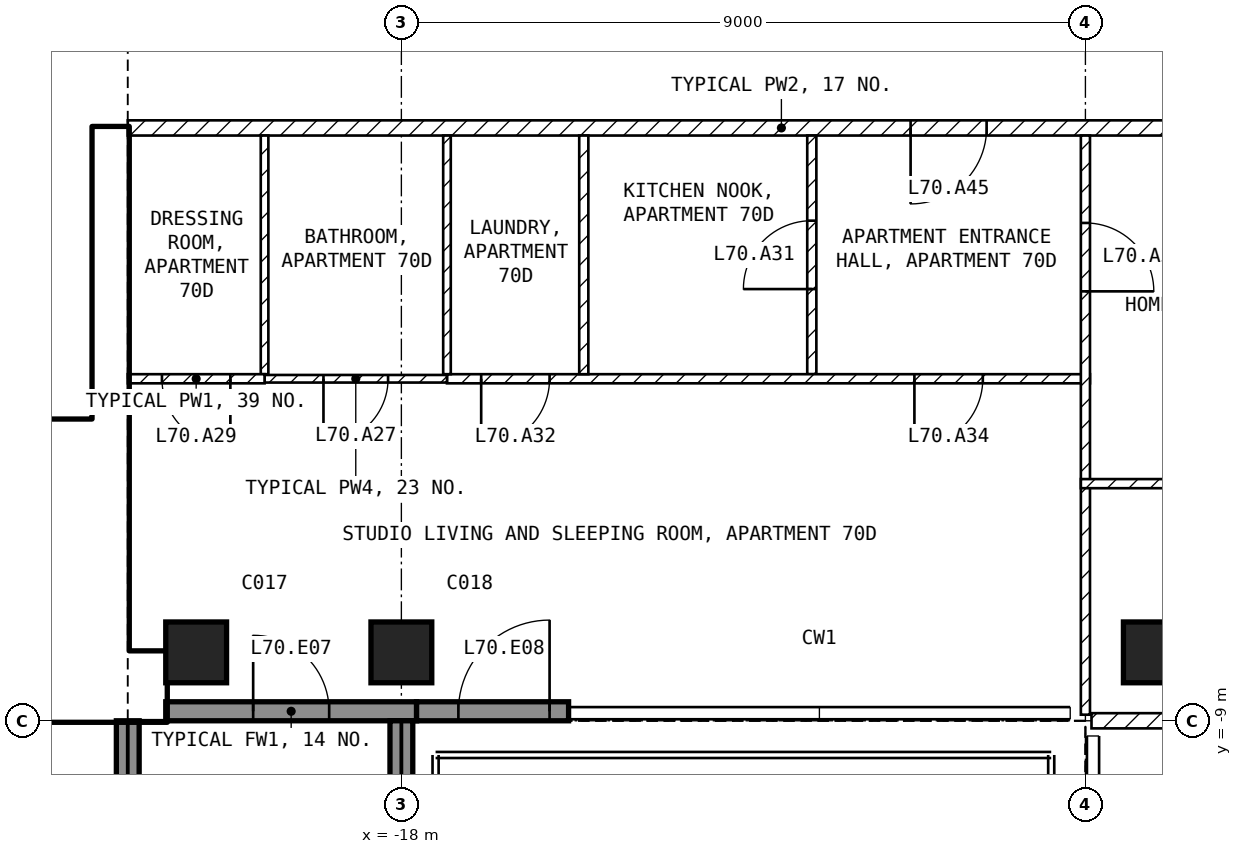
"""IFC4 building model, lengths in metres.
Left out: names, types, materials, properties, quantities, classifications, styles, units other than length and angle.
Written with IfcOpenShell. Run it as: python <this file> out.ifc"""

import sys

from ifc_helpers import new_model, si_unit, direction, frame, frame_2d, origin, origin_2d, place, context, subcontext, project, spatial, rectangle, extrude, element, fill, save


model = new_model("IFC4")
c1 = context("Model", 3, precision=1e-05, world=origin(), true_north=direction((0.0, 1.0)))
c2 = subcontext(c1, "Body", "Model", "MODEL_VIEW")
j1 = project(units=[si_unit("LENGTHUNIT", "METRE"), si_unit("PLANEANGLEUNIT", "RADIAN")], contexts=[c1])
p1 = place(None, origin())
s1 = spatial("IfcSite", under=j1, at=p1, CompositionType="ELEMENT")
p2 = place(p1, origin())
s2 = spatial("IfcBuilding", under=s1, at=p2, CompositionType="ELEMENT")
p3 = place(p2, frame((0.0, 0.0, 274.5)))
s3 = spatial("IfcBuildingStorey", under=s2, at=p3, CompositionType="ELEMENT", Elevation=274.5)
for number, where, z_axis, x_axis in (
    (1, (-20.7, -8.1, -0.25), (0.0, 0.0, 1.0), (1.0, 0.0, 0.0)),
    (2, (-18.0, -8.1, -0.25), (0.0, 0.0, 1.0), (1.0, 0.0, 0.0)),
    (3, (-8.1, -8.1, -0.25), (0.0, 0.0, 1.0), (1.0, 0.0, 0.0)),
):
    element("IfcColumn", number, at=place(p3, frame(where, z_axis=z_axis, x_axis=x_axis)), inside=s3, PredefinedType="COLUMN", context=c2, shape_type="SweptSolid", body=[
        extrude(rectangle(XDim=0.8, YDim=0.8, at=origin_2d()), origin(), (0.0, 0.0, 1.0), 3.5),
    ])
p4 = place(p3, frame((-21.1, -8.875, 0.0), z_axis=(0.0, 0.0, 1.0), x_axis=(1.0, 0.0, 0.0)))
e4 = element("IfcWall", 4, at=p4, inside=s3, PredefinedType="SOLIDWALL", context=c2, shape_type="SweptSolid", body=[
    extrude(rectangle(XDim=3.3, YDim=0.25, at=frame_2d((1.65, 0.0))), origin(), (0.0, 0.0, 1.0), 3.25),
])
p5 = place(p4, frame((1.15, 0.0, 0.0)))
e5 = element("IfcOpeningElement", 5, at=p5, cuts=e4, PredefinedType="OPENING", context=c2, shape_type="SweptSolid", body=[
    extrude(rectangle(XDim=1.0, YDim=2.4, at=frame_2d((0.5, 1.2))), frame((0.0, 0.135, 0.0), z_axis=(0.0, -1.0, 0.0), x_axis=(1.0, 0.0, 0.0)), (0.0, 0.0, 1.0), 0.27),
])
p6 = place(p3, frame((-17.8, -8.875, 0.0), z_axis=(0.0, 0.0, 1.0), x_axis=(1.0, 0.0, 0.0)))
e6 = element("IfcWall", 6, at=p6, inside=s3, PredefinedType="SOLIDWALL", context=c2, shape_type="SweptSolid", body=[
    extrude(rectangle(XDim=2.0, YDim=0.25, at=frame_2d((1.0, 0.0))), origin(), (0.0, 0.0, 1.0), 3.25),
])
p7 = place(p6, frame((0.55, 0.0, 0.0)))
e7 = element("IfcOpeningElement", 7, at=p7, cuts=e6, PredefinedType="OPENING", context=c2, shape_type="SweptSolid", body=[
    extrude(rectangle(XDim=1.2, YDim=2.4, at=frame_2d((0.6, 1.2))), frame((0.0, 0.135, 0.0), z_axis=(0.0, -1.0, 0.0), x_axis=(1.0, 0.0, 0.0)), (0.0, 0.0, 1.0), 0.27),
])
p8 = place(p3, frame((-21.6, -9.0, 0.0), z_axis=(0.0, 0.0, 1.0), x_axis=(0.0, -1.0, 0.0)))
e8 = element("IfcWall", 8, at=p8, inside=s3, PredefinedType="SOLIDWALL", context=c2, shape_type="SweptSolid", body=[
    extrude(rectangle(XDim=2.7, YDim=0.3, at=frame_2d((1.35, 0.0))), origin(), (0.0, 0.0, 1.0), 3.25),
])
p9 = place(p3, frame((-18.0, -9.0, 0.0), z_axis=(0.0, 0.0, 1.0), x_axis=(0.0, -1.0, 0.0)))
e9 = element("IfcWall", 9, at=p9, inside=s3, PredefinedType="SOLIDWALL", context=c2, shape_type="SweptSolid", body=[
    extrude(rectangle(XDim=2.74, YDim=0.3, at=frame_2d((1.37, 0.0))), origin(), (0.0, 0.0, 1.0), 3.25),
])
p10 = place(p3, frame((-30.2, -8.55, 0.0), z_axis=(0.0, 0.0, 1.0), x_axis=(1.0, 0.0, 0.0)))
e10 = element("IfcWall", 10, at=p10, inside=s3, PredefinedType="SHEAR", context=c2, shape_type="SweptSolid", body=[
    extrude(rectangle(XDim=9.1, YDim=0.9, at=frame_2d((4.55, 0.0))), origin(), (0.0, 0.0, 1.0), 3.25),
])
p11 = place(p3, frame((-21.825, -8.1, 0.0), z_axis=(0.0, 0.0, 1.0), x_axis=(0.0, 1.0, 0.0)))
e11 = element("IfcWall", 11, at=p11, inside=s3, PredefinedType="SHEAR", context=c2, shape_type="SweptSolid", body=[
    extrude(rectangle(XDim=6.9, YDim=0.45, at=frame_2d((3.45, 0.0))), origin(), (0.0, 0.0, 1.0), 3.25),
])
p12 = place(p3, frame((-28.35, -5.15, 0.0), z_axis=(0.0, 0.0, 1.0), x_axis=(1.0, 0.0, 0.0)))
e12 = element("IfcWall", 12, at=p12, inside=s3, PredefinedType="SOLIDWALL", context=c2, shape_type="SweptSolid", body=[
    extrude(rectangle(XDim=6.3, YDim=0.2, at=frame_2d((3.15, 0.0))), origin(), (0.0, 0.0, 1.0), 3.25),
])
p13 = place(p12, frame((5.1, 0.0, 0.0)))
e13 = element("IfcOpeningElement", 13, at=p13, cuts=e12, PredefinedType="OPENING", context=c2, shape_type="SweptSolid", body=[
    extrude(rectangle(XDim=1.0, YDim=2.1, at=frame_2d((0.5, 1.05))), frame((0.0, 0.11, 0.0), z_axis=(0.0, -1.0, 0.0), x_axis=(1.0, 0.0, 0.0)), (0.0, 0.0, 1.0), 0.22),
])
p14 = place(p3, frame((-4.4, -1.2, 0.0), z_axis=(0.0, 0.0, 1.0), x_axis=(-1.0, 0.0, 0.0)))
e14 = element("IfcWall", 14, at=p14, inside=s3, PredefinedType="PARTITIONING", context=c2, shape_type="SweptSolid", body=[
    extrude(rectangle(XDim=17.2, YDim=0.2, at=frame_2d((8.6, 0.0))), origin(), (0.0, 0.0, 1.0), 3.25),
])
p15 = place(p14, frame((5.9, 0.0, 0.0)))
e15 = element("IfcOpeningElement", 15, at=p15, cuts=e14, PredefinedType="OPENING", context=c2, shape_type="SweptSolid", body=[
    extrude(rectangle(XDim=1.0, YDim=2.1, at=frame_2d((0.5, 1.05))), frame((0.0, 0.11, 0.0), z_axis=(0.0, -1.0, 0.0), x_axis=(1.0, 0.0, 0.0)), (0.0, 0.0, 1.0), 0.22),
])
p16 = place(p3, frame((8.92, -9.0, 0.0), z_axis=(0.0, 0.0, 1.0), x_axis=(-1.0, 0.0, 0.0)))
e16 = element("IfcWall", 16, at=p16, inside=s3, PredefinedType="PARTITIONING", context=c2, shape_type="SweptSolid", body=[
    extrude(rectangle(XDim=17.84, YDim=0.2, at=frame_2d((8.92, 0.0))), origin(), (0.0, 0.0, 1.0), 3.25),
])
p17 = place(p16, frame((8.42, 0.0, 0.0)))
e17 = element("IfcOpeningElement", 17, at=p17, cuts=e16, PredefinedType="OPENING", context=c2, shape_type="SweptSolid", body=[
    extrude(rectangle(XDim=1.0, YDim=2.1, at=frame_2d((0.5, 1.05))), frame((0.0, 0.11, 0.0), z_axis=(0.0, -1.0, 0.0), x_axis=(1.0, 0.0, 0.0)), (0.0, 0.0, 1.0), 0.22),
])
p18 = place(p3, frame((-12.6, -4.44, 0.0), z_axis=(0.0, 0.0, 1.0), x_axis=(0.0, 1.0, 0.0)))
e18 = element("IfcWall", 18, at=p18, inside=s3, PredefinedType="PARTITIONING", context=c2, shape_type="SweptSolid", body=[
    extrude(rectangle(XDim=3.14, YDim=0.12, at=frame_2d((1.57, 0.0))), origin(), (0.0, 0.0, 1.0), 3.25),
])
p19 = place(p18, frame((1.12, 0.0, 0.0)))
e19 = element("IfcOpeningElement", 19, at=p19, cuts=e18, PredefinedType="OPENING", context=c2, shape_type="SweptSolid", body=[
    extrude(rectangle(XDim=0.9, YDim=2.1, at=frame_2d((0.45, 1.05))), frame((0.0, 0.07, 0.0), z_axis=(0.0, -1.0, 0.0), x_axis=(1.0, 0.0, 0.0)), (0.0, 0.0, 1.0), 0.14),
])
p20 = place(p3, frame((-8.94, -4.5, 0.0), z_axis=(0.0, 0.0, 1.0), x_axis=(-1.0, 0.0, 0.0)))
e20 = element("IfcWall", 20, at=p20, inside=s3, PredefinedType="PARTITIONING", context=c2, shape_type="SweptSolid", body=[
    extrude(rectangle(XDim=8.46, YDim=0.12, at=frame_2d((4.23, 0.0))), origin(), (0.0, 0.0, 1.0), 3.25),
])
p21 = place(p20, frame((7.11, 0.0, 0.0)))
e21 = element("IfcOpeningElement", 21, at=p21, cuts=e20, PredefinedType="OPENING", context=c2, shape_type="SweptSolid", body=[
    extrude(rectangle(XDim=0.9, YDim=2.1, at=frame_2d((0.45, 1.05))), frame((0.0, 0.07, 0.0), z_axis=(0.0, -1.0, 0.0), x_axis=(1.0, 0.0, 0.0)), (0.0, 0.0, 1.0), 0.14),
])
p22 = place(p20, frame((1.41, 0.0, 0.0)))
e22 = element("IfcOpeningElement", 22, at=p22, cuts=e20, PredefinedType="OPENING", context=c2, shape_type="SweptSolid", body=[
    extrude(rectangle(XDim=0.9, YDim=2.1, at=frame_2d((0.45, 1.05))), frame((0.0, 0.07, 0.0), z_axis=(0.0, -1.0, 0.0), x_axis=(1.0, 0.0, 0.0)), (0.0, 0.0, 1.0), 0.14),
])
p23 = place(p3, frame((-9.0, -1.3, 0.0), z_axis=(0.0, 0.0, 1.0), x_axis=(0.0, -1.0, 0.0)))
e23 = element("IfcWall", 23, at=p23, inside=s3, PredefinedType="PARTITIONING", context=c2, shape_type="SweptSolid", body=[
    extrude(rectangle(XDim=7.62, YDim=0.12, at=frame_2d((3.81, 0.0))), origin(), (0.0, 0.0, 1.0), 3.25),
])
p24 = place(p23, frame((1.15, 0.0, 0.0)))
e24 = element("IfcOpeningElement", 24, at=p24, cuts=e23, PredefinedType="OPENING", context=c2, shape_type="SweptSolid", body=[
    extrude(rectangle(XDim=0.9, YDim=2.1, at=frame_2d((0.45, 1.05))), frame((0.0, 0.07, 0.0), z_axis=(0.0, -1.0, 0.0), x_axis=(1.0, 0.0, 0.0)), (0.0, 0.0, 1.0), 0.14),
])
p25 = place(p3, frame((-15.6, -4.44, 0.0), z_axis=(0.0, 0.0, 1.0), x_axis=(0.0, 1.0, 0.0)))
e25 = element("IfcWall", 25, at=p25, inside=s3, PredefinedType="PARTITIONING", context=c2, shape_type="SweptSolid", body=[
    extrude(rectangle(XDim=3.14, YDim=0.12, at=frame_2d((1.57, 0.0))), origin(), (0.0, 0.0, 1.0), 3.25),
])
for number, where, z_axis, x_axis in (
    (26, (-17.4, -4.44, 0.0), (0.0, 0.0, 1.0), (0.0, 1.0, 0.0)),
    (27, (-19.8, -4.44, 0.0), (0.0, 0.0, 1.0), (0.0, 1.0, 0.0)),
):
    element("IfcWall", number, at=place(p3, frame(where, z_axis=z_axis, x_axis=x_axis)), inside=s3, PredefinedType="PARTITIONING", context=c2, shape_type="SweptSolid", body=[
        extrude(rectangle(XDim=3.14, YDim=0.1, at=frame_2d((1.57, 0.0))), origin(), (0.0, 0.0, 1.0), 3.25),
    ])
p26 = place(p3, frame((-17.4, -4.5, 0.0), z_axis=(0.0, 0.0, 1.0), x_axis=(-1.0, 0.0, 0.0)))
e28 = element("IfcWall", 28, at=p26, inside=s3, PredefinedType="PARTITIONING", context=c2, shape_type="SweptSolid", body=[
    extrude(rectangle(XDim=2.4, YDim=0.1, at=frame_2d((1.2, 0.0))), origin(), (0.0, 0.0, 1.0), 3.25),
])
p27 = place(p26, frame((0.775, 0.0, 0.0)))
e29 = element("IfcOpeningElement", 29, at=p27, cuts=e28, PredefinedType="OPENING", context=c2, shape_type="SweptSolid", body=[
    extrude(rectangle(XDim=0.85, YDim=2.1, at=frame_2d((0.425, 1.05))), frame((0.0, 0.06, 0.0), z_axis=(0.0, -1.0, 0.0), x_axis=(1.0, 0.0, 0.0)), (0.0, 0.0, 1.0), 0.12),
])
p28 = place(p3, frame((-19.8, -4.5, 0.0), z_axis=(0.0, 0.0, 1.0), x_axis=(-1.0, 0.0, 0.0)))
e30 = element("IfcWall", 30, at=p28, inside=s3, PredefinedType="PARTITIONING", context=c2, shape_type="SweptSolid", body=[
    extrude(rectangle(XDim=1.8, YDim=0.12, at=frame_2d((0.9, 0.0))), origin(), (0.0, 0.0, 1.0), 3.25),
])
p29 = place(p28, frame((0.45, 0.0, 0.0)))
e31 = element("IfcOpeningElement", 31, at=p29, cuts=e30, PredefinedType="OPENING", context=c2, shape_type="SweptSolid", body=[
    extrude(rectangle(XDim=0.9, YDim=2.1, at=frame_2d((0.45, 1.05))), frame((0.0, 0.07, 0.0), z_axis=(0.0, -1.0, 0.0), x_axis=(1.0, 0.0, 0.0)), (0.0, 0.0, 1.0), 0.14),
])
p30 = place(p3, frame((-4.44, -5.88, 0.0), z_axis=(0.0, 0.0, 1.0), x_axis=(-1.0, 0.0, 0.0)))
e32 = element("IfcWall", 32, at=p30, inside=s3, PredefinedType="PARTITIONING", context=c2, shape_type="SweptSolid", body=[
    extrude(rectangle(XDim=4.62, YDim=0.12, at=frame_2d((2.31, 0.0))), origin(), (0.0, 0.0, 1.0), 3.25),
])
p31 = place(p30, frame((1.86, 0.0, 0.0)))
e33 = element("IfcOpeningElement", 33, at=p31, cuts=e32, PredefinedType="OPENING", context=c2, shape_type="SweptSolid", body=[
    extrude(rectangle(XDim=0.9, YDim=2.1, at=frame_2d((0.45, 1.05))), frame((0.0, 0.07, 0.0), z_axis=(0.0, -1.0, 0.0), x_axis=(1.0, 0.0, 0.0)), (0.0, 0.0, 1.0), 0.14),
])
p32 = place(p5, origin())
e34 = element("IfcDoor", 34, at=p32, inside=s3, OperationType="SINGLE_SWING_LEFT", PredefinedType="DOOR", context=c2, shape_type="SweptSolid", body=[
    extrude(rectangle(XDim=1.0, YDim=2.4, at=frame_2d((0.5, 1.2))), frame((0.0, 0.025, 0.0), z_axis=(0.0, -1.0, 0.0), x_axis=(1.0, 0.0, 0.0)), (0.0, 0.0, 1.0), 0.05),
])
fill(e5, e34)
p33 = place(p7, origin())
e35 = element("IfcDoor", 35, at=p33, inside=s3, OperationType="SINGLE_SWING_RIGHT", PredefinedType="DOOR", context=c2, shape_type="SweptSolid", body=[
    extrude(rectangle(XDim=1.2, YDim=2.4, at=frame_2d((0.6, 1.2))), frame((0.0, 0.025, 0.0), z_axis=(0.0, -1.0, 0.0), x_axis=(1.0, 0.0, 0.0)), (0.0, 0.0, 1.0), 0.05),
])
fill(e7, e35)
p34 = place(p13, origin())
e36 = element("IfcDoor", 36, at=p34, inside=s3, OperationType="SINGLE_SWING_LEFT", PredefinedType="DOOR", context=c2, shape_type="SweptSolid", body=[
    extrude(rectangle(XDim=1.0, YDim=2.1, at=frame_2d((0.5, 1.05))), frame((0.0, 0.025, 0.0), z_axis=(0.0, -1.0, 0.0), x_axis=(1.0, 0.0, 0.0)), (0.0, 0.0, 1.0), 0.05),
])
fill(e13, e36)
p35 = place(p27, origin())
e37 = element("IfcDoor", 37, at=p35, inside=s3, OperationType="SINGLE_SWING_RIGHT", PredefinedType="DOOR", context=c2, shape_type="SweptSolid", body=[
    extrude(rectangle(XDim=0.85, YDim=2.1, at=frame_2d((0.425, 1.05))), frame((0.0, 0.025, 0.0), z_axis=(0.0, -1.0, 0.0), x_axis=(1.0, 0.0, 0.0)), (0.0, 0.0, 1.0), 0.05),
])
fill(e29, e37)
p36 = place(p29, origin())
e38 = element("IfcDoor", 38, at=p36, inside=s3, OperationType="SINGLE_SWING_LEFT", PredefinedType="DOOR", context=c2, shape_type="SweptSolid", body=[
    extrude(rectangle(XDim=0.9, YDim=2.1, at=frame_2d((0.45, 1.05))), frame((0.0, 0.025, 0.0), z_axis=(0.0, -1.0, 0.0), x_axis=(1.0, 0.0, 0.0)), (0.0, 0.0, 1.0), 0.05),
])
fill(e31, e38)
p37 = place(p24, origin())
e39 = element("IfcDoor", 39, at=p37, inside=s3, OperationType="SINGLE_SWING_RIGHT", PredefinedType="DOOR", context=c2, shape_type="SweptSolid", body=[
    extrude(rectangle(XDim=0.9, YDim=2.1, at=frame_2d((0.45, 1.05))), frame((0.0, 0.025, 0.0), z_axis=(0.0, -1.0, 0.0), x_axis=(1.0, 0.0, 0.0)), (0.0, 0.0, 1.0), 0.05),
])
fill(e24, e39)
p38 = place(p19, origin())
e40 = element("IfcDoor", 40, at=p38, inside=s3, OperationType="SINGLE_SWING_LEFT", PredefinedType="DOOR", context=c2, shape_type="SweptSolid", body=[
    extrude(rectangle(XDim=0.9, YDim=2.1, at=frame_2d((0.45, 1.05))), frame((0.0, 0.025, 0.0), z_axis=(0.0, -1.0, 0.0), x_axis=(1.0, 0.0, 0.0)), (0.0, 0.0, 1.0), 0.05),
])
fill(e19, e40)
p39 = place(p21, origin())
e41 = element("IfcDoor", 41, at=p39, inside=s3, OperationType="SINGLE_SWING_RIGHT", PredefinedType="DOOR", context=c2, shape_type="SweptSolid", body=[
    extrude(rectangle(XDim=0.9, YDim=2.1, at=frame_2d((0.45, 1.05))), frame((0.0, 0.025, 0.0), z_axis=(0.0, -1.0, 0.0), x_axis=(1.0, 0.0, 0.0)), (0.0, 0.0, 1.0), 0.05),
])
fill(e21, e41)
p40 = place(p22, origin())
e42 = element("IfcDoor", 42, at=p40, inside=s3, OperationType="SINGLE_SWING_RIGHT", PredefinedType="DOOR", context=c2, shape_type="SweptSolid", body=[
    extrude(rectangle(XDim=0.9, YDim=2.1, at=frame_2d((0.45, 1.05))), frame((0.0, 0.025, 0.0), z_axis=(0.0, -1.0, 0.0), x_axis=(1.0, 0.0, 0.0)), (0.0, 0.0, 1.0), 0.05),
])
fill(e22, e42)
p41 = place(p15, origin())
e43 = element("IfcDoor", 43, at=p41, inside=s3, OperationType="SINGLE_SWING_RIGHT", PredefinedType="DOOR", context=c2, shape_type="SweptSolid", body=[
    extrude(rectangle(XDim=1.0, YDim=2.1, at=frame_2d((0.5, 1.05))), frame((0.0, 0.025, 0.0), z_axis=(0.0, -1.0, 0.0), x_axis=(1.0, 0.0, 0.0)), (0.0, 0.0, 1.0), 0.05),
])
fill(e15, e43)
save(model, sys.argv[1])
